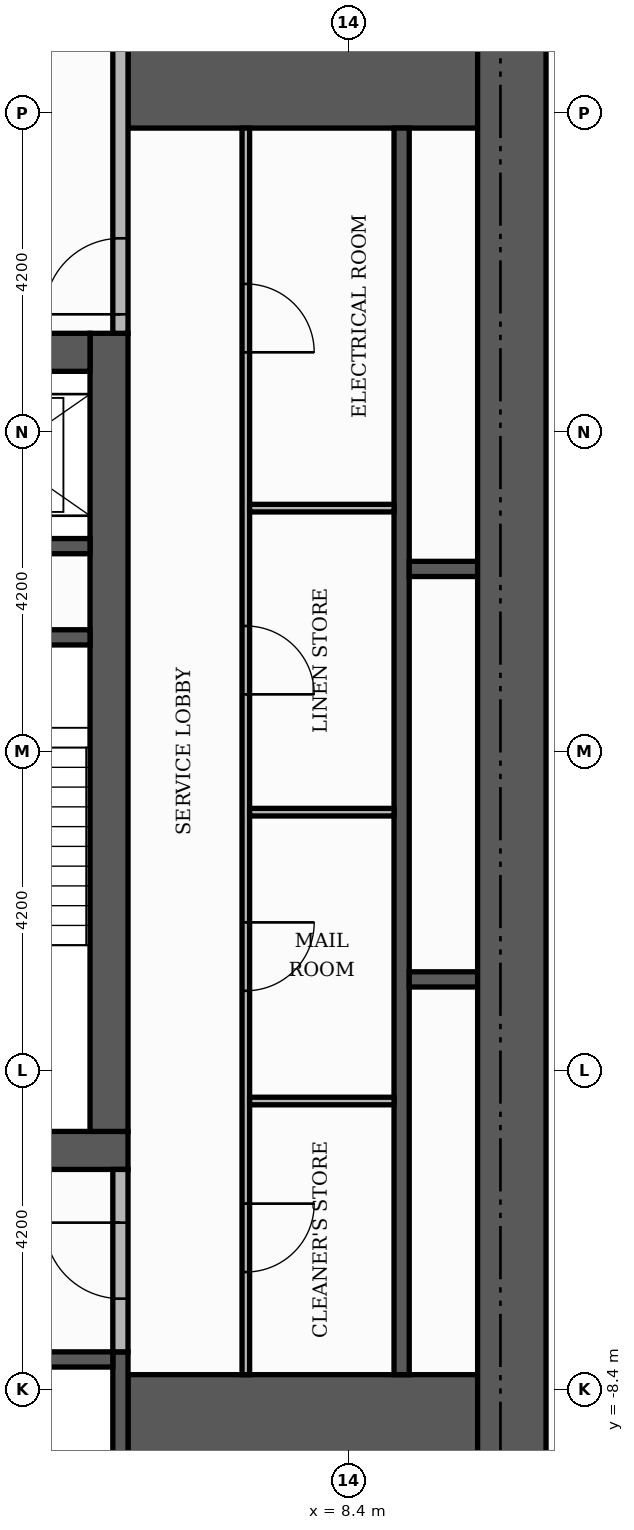
"""IFC4 building model, lengths in metres.
Left out: names, types, materials, properties, quantities, classifications, styles, units other than length and angle.
Written with IfcOpenShell. Run it as: python <this file> out.ifc"""

import sys

from ifc_helpers import new_model, si_unit, direction, frame, frame_2d, origin, place, context, subcontext, project, spatial, rectangle, extrude, element, fill, save


model = new_model("IFC4")
c1 = context("Model", 3, precision=1e-05, world=origin(), true_north=direction((0.0, 1.0)))
c2 = subcontext(c1, "Body", "Model", "MODEL_VIEW")
j1 = project(units=[si_unit("LENGTHUNIT", "METRE"), si_unit("PLANEANGLEUNIT", "RADIAN")], contexts=[c1])
p1 = place(None, origin())
s1 = spatial("IfcSite", under=j1, at=p1, CompositionType="ELEMENT")
p2 = place(p1, origin())
s2 = spatial("IfcBuilding", under=s1, at=p2, CompositionType="ELEMENT")
p3 = place(p2, frame((0.0, 0.0, 110.4)))
s3 = spatial("IfcBuildingStorey", under=s2, at=p3, CompositionType="ELEMENT", Elevation=110.4)
p4 = place(p3, frame((-5.5, -5.25, 0.0), z_axis=(0.0, 0.0, 1.0), x_axis=(1.0, 0.0, 0.0)))
e1 = element("IfcWall", 1, at=p4, inside=s3, PredefinedType="SHEAR", context=c2, shape_type="SweptSolid", body=[
    extrude(rectangle(XDim=11.0, YDim=0.5, at=frame_2d((5.5, 0.0))), origin(), (0.0, 0.0, 1.0), 3.48),
])
p5 = place(p4, frame((4.9, 0.0, 0.0)))
e2 = element("IfcOpeningElement", 2, at=p5, cuts=e1, PredefinedType="OPENING", context=c2, shape_type="SweptSolid", body=[
    extrude(rectangle(XDim=1.2, YDim=2.1, at=frame_2d((0.6, 1.05))), frame((0.0, 0.26, 0.0), z_axis=(0.0, -1.0, 0.0), x_axis=(1.0, 0.0, 0.0)), (0.0, 0.0, 1.0), 0.52),
])
p6 = place(p3, frame((5.25, -5.0, 0.0), z_axis=(0.0, 0.0, 1.0), x_axis=(0.0, 1.0, 0.0)))
e3 = element("IfcWall", 3, at=p6, inside=s3, PredefinedType="SHEAR", context=c2, shape_type="SweptSolid", body=[
    extrude(rectangle(XDim=10.5, YDim=0.5, at=frame_2d((5.25, 0.0))), origin(), (0.0, 0.0, 1.0), 3.48),
])
p7 = place(p3, frame((-5.0, 5.25, 0.0), z_axis=(0.0, 0.0, 1.0), x_axis=(1.0, 0.0, 0.0)))
e4 = element("IfcWall", 4, at=p7, inside=s3, PredefinedType="SHEAR", context=c2, shape_type="SweptSolid", body=[
    extrude(rectangle(XDim=10.0, YDim=0.5, at=frame_2d((5.0, 0.0))), origin(), (0.0, 0.0, 1.0), 3.48),
])
p8 = place(p7, frame((4.4, 0.0, 0.0)))
e5 = element("IfcOpeningElement", 5, at=p8, cuts=e4, PredefinedType="OPENING", context=c2, shape_type="SweptSolid", body=[
    extrude(rectangle(XDim=1.2, YDim=2.1, at=frame_2d((0.6, 1.05))), frame((0.0, 0.26, 0.0), z_axis=(0.0, -1.0, 0.0), x_axis=(1.0, 0.0, 0.0)), (0.0, 0.0, 1.0), 0.52),
])
for number, where, z_axis, x_axis in (
    (6, (5.5, -9.15, 0.0), (0.0, 0.0, 1.0), (1.0, 0.0, 0.0)),
    (7, (5.5, 9.15, 0.0), (0.0, 0.0, 1.0), (1.0, 0.0, 0.0)),
):
    element("IfcWall", number, at=place(p3, frame(where, z_axis=z_axis, x_axis=x_axis)), inside=s3, PredefinedType="SHEAR", context=c2, shape_type="SweptSolid", body=[
        extrude(rectangle(XDim=4.6, YDim=1.9, at=frame_2d((2.3, 0.0))), origin(), (0.0, 0.0, 1.0), 3.48),
    ])
p9 = place(p3, frame((2.15, 1.5, 0.0), z_axis=(0.0, 0.0, 1.0), x_axis=(1.0, 0.0, 0.0)))
e8 = element("IfcWall", 8, at=p9, inside=s3, PredefinedType="SHEAR", context=c2, shape_type="SweptSolid", body=[
    extrude(rectangle(XDim=2.85, YDim=0.2, at=frame_2d((1.425, 0.0))), origin(), (0.0, 0.0, 1.0), 3.48),
])
p10 = place(p3, frame((5.4, -10.1, 0.0), z_axis=(0.0, 0.0, 1.0), x_axis=(0.0, 1.0, 0.0)))
e9 = element("IfcWall", 9, at=p10, inside=s3, PredefinedType="SHEAR", context=c2, shape_type="SweptSolid", body=[
    extrude(rectangle(XDim=2.2, YDim=0.2, at=frame_2d((1.1, 0.0))), origin(), (0.0, 0.0, 1.0), 3.48),
])
p11 = place(p3, frame((9.1, -8.2, 0.0), z_axis=(0.0, 0.0, 1.0), x_axis=(0.0, 1.0, 0.0)))
e10 = element("IfcWall", 10, at=p11, inside=s3, PredefinedType="SHEAR", context=c2, shape_type="SweptSolid", body=[
    extrude(rectangle(XDim=16.4, YDim=0.2, at=frame_2d((8.2, 0.0))), origin(), (0.0, 0.0, 1.0), 3.48),
])
p12 = place(p3, frame((2.8, -8.0, 0.0), z_axis=(0.0, 0.0, 1.0), x_axis=(1.0, 0.0, 0.0)))
e11 = element("IfcWall", 11, at=p12, inside=s3, PredefinedType="SHEAR", context=c2, shape_type="SweptSolid", body=[
    extrude(rectangle(XDim=2.5, YDim=0.2, at=frame_2d((1.25, 0.0))), origin(), (0.0, 0.0, 1.0), 3.48),
])
for number, where, z_axis, x_axis in (
    (12, (9.2, -3.0, 0.0), (0.0, 0.0, 1.0), (1.0, 0.0, 0.0)),
    (13, (9.2, 2.4, 0.0), (0.0, 0.0, 1.0), (1.0, 0.0, 0.0)),
):
    element("IfcWall", number, at=place(p3, frame(where, z_axis=z_axis, x_axis=x_axis)), inside=s3, PredefinedType="SHEAR", context=c2, shape_type="SweptSolid", body=[
        extrude(rectangle(XDim=0.9, YDim=0.2, at=frame_2d((0.45, 0.0))), origin(), (0.0, 0.0, 1.0), 3.48),
    ])
p13 = place(p3, frame((2.15, 2.7, 0.0), z_axis=(0.0, 0.0, 1.0), x_axis=(1.0, 0.0, 0.0)))
e14 = element("IfcWall", 14, at=p13, inside=s3, PredefinedType="SHEAR", context=c2, shape_type="SweptSolid", body=[
    extrude(rectangle(XDim=2.85, YDim=0.2, at=frame_2d((1.425, 0.0))), origin(), (0.0, 0.0, 1.0), 3.48),
])
p14 = place(p3, frame((10.55, -10.1, 0.0), z_axis=(0.0, 0.0, 1.0), x_axis=(0.0, 1.0, 0.0)))
e15 = element("IfcWall", 15, at=p14, inside=s3, PredefinedType="SHEAR", context=c2, shape_type="SweptSolid", body=[
    extrude(rectangle(XDim=20.2, YDim=0.9, at=frame_2d((10.1, 0.0))), origin(), (0.0, 0.0, 1.0), 3.48),
])
p15 = place(p3, frame((7.05, -8.2, 0.0), z_axis=(0.0, 0.0, 1.0), x_axis=(0.0, 1.0, 0.0)))
e16 = element("IfcWall", 16, at=p15, inside=s3, PredefinedType="PARTITIONING", context=c2, shape_type="SweptSolid", body=[
    extrude(rectangle(XDim=16.4, YDim=0.1, at=frame_2d((8.2, 0.0))), origin(), (0.0, 0.0, 1.0), 3.48),
])
p16 = place(p15, frame((1.35, 0.0, 0.0)))
e17 = element("IfcOpeningElement", 17, at=p16, cuts=e16, PredefinedType="OPENING", context=c2, shape_type="SweptSolid", body=[
    extrude(rectangle(XDim=0.9, YDim=2.1, at=frame_2d((0.45, 1.05))), frame((0.0, 0.06, 0.0), z_axis=(0.0, -1.0, 0.0), x_axis=(1.0, 0.0, 0.0)), (0.0, 0.0, 1.0), 0.12),
])
p17 = place(p15, frame((5.05, 0.0, 0.0)))
e18 = element("IfcOpeningElement", 18, at=p17, cuts=e16, PredefinedType="OPENING", context=c2, shape_type="SweptSolid", body=[
    extrude(rectangle(XDim=0.9, YDim=2.1, at=frame_2d((0.45, 1.05))), frame((0.0, 0.06, 0.0), z_axis=(0.0, -1.0, 0.0), x_axis=(1.0, 0.0, 0.0)), (0.0, 0.0, 1.0), 0.12),
])
p18 = place(p15, frame((8.95, 0.0, 0.0)))
e19 = element("IfcOpeningElement", 19, at=p18, cuts=e16, PredefinedType="OPENING", context=c2, shape_type="SweptSolid", body=[
    extrude(rectangle(XDim=0.9, YDim=2.1, at=frame_2d((0.45, 1.05))), frame((0.0, 0.06, 0.0), z_axis=(0.0, -1.0, 0.0), x_axis=(1.0, 0.0, 0.0)), (0.0, 0.0, 1.0), 0.12),
])
p19 = place(p15, frame((13.45, 0.0, 0.0)))
e20 = element("IfcOpeningElement", 20, at=p19, cuts=e16, PredefinedType="OPENING", context=c2, shape_type="SweptSolid", body=[
    extrude(rectangle(XDim=0.9, YDim=2.1, at=frame_2d((0.45, 1.05))), frame((0.0, 0.06, 0.0), z_axis=(0.0, -1.0, 0.0), x_axis=(1.0, 0.0, 0.0)), (0.0, 0.0, 1.0), 0.12),
])
p20 = place(p3, frame((5.4, -7.9, 0.0), z_axis=(0.0, 0.0, 1.0), x_axis=(0.0, 1.0, 0.0)))
e21 = element("IfcWall", 21, at=p20, inside=s3, PredefinedType="PARTITIONING", context=c2, shape_type="SweptSolid", body=[
    extrude(rectangle(XDim=2.4, YDim=0.2, at=frame_2d((1.2, 0.0))), origin(), (0.0, 0.0, 1.0), 3.48),
])
p21 = place(p20, frame((0.7, 0.0, 0.0)))
e22 = element("IfcOpeningElement", 22, at=p21, cuts=e21, PredefinedType="OPENING", context=c2, shape_type="SweptSolid", body=[
    extrude(rectangle(XDim=1.0, YDim=2.1, at=frame_2d((0.5, 1.05))), frame((0.0, 0.11, 0.0), z_axis=(0.0, -1.0, 0.0), x_axis=(1.0, 0.0, 0.0)), (0.0, 0.0, 1.0), 0.22),
])
for number, where, z_axis, x_axis in (
    (23, (7.1, -4.6, 0.0), (0.0, 0.0, 1.0), (1.0, 0.0, 0.0)),
    (24, (7.1, -0.8, 0.0), (0.0, 0.0, 1.0), (1.0, 0.0, 0.0)),
    (25, (7.1, 3.2, 0.0), (0.0, 0.0, 1.0), (1.0, 0.0, 0.0)),
):
    element("IfcWall", number, at=place(p3, frame(where, z_axis=z_axis, x_axis=x_axis)), inside=s3, PredefinedType="PARTITIONING", context=c2, shape_type="SweptSolid", body=[
        extrude(rectangle(XDim=1.9, YDim=0.1, at=frame_2d((0.95, 0.0))), origin(), (0.0, 0.0, 1.0), 3.48),
    ])
p22 = place(p3, frame((5.4, 5.5, 0.0), z_axis=(0.0, 0.0, 1.0), x_axis=(0.0, 1.0, 0.0)))
e26 = element("IfcWall", 26, at=p22, inside=s3, PredefinedType="PARTITIONING", context=c2, shape_type="SweptSolid", body=[
    extrude(rectangle(XDim=4.6, YDim=0.2, at=frame_2d((2.3, 0.0))), origin(), (0.0, 0.0, 1.0), 3.48),
])
p23 = place(p22, frame((0.25, 0.0, 0.0)))
e27 = element("IfcOpeningElement", 27, at=p23, cuts=e26, PredefinedType="OPENING", context=c2, shape_type="SweptSolid", body=[
    extrude(rectangle(XDim=1.0, YDim=2.1, at=frame_2d((0.5, 1.05))), frame((0.0, 0.11, 0.0), z_axis=(0.0, -1.0, 0.0), x_axis=(1.0, 0.0, 0.0)), (0.0, 0.0, 1.0), 0.22),
])
p24 = place(p23, origin())
e28 = element("IfcDoor", 28, at=p24, inside=s3, OperationType="SINGLE_SWING_LEFT", PredefinedType="DOOR", context=c2, shape_type="SweptSolid", body=[
    extrude(rectangle(XDim=1.0, YDim=2.1, at=frame_2d((0.5, 1.05))), frame((0.0, 0.025, 0.0), z_axis=(0.0, -1.0, 0.0), x_axis=(1.0, 0.0, 0.0)), (0.0, 0.0, 1.0), 0.05),
])
fill(e27, e28)
p25 = place(p21, origin())
e29 = element("IfcDoor", 29, at=p25, inside=s3, OperationType="SINGLE_SWING_RIGHT", PredefinedType="DOOR", context=c2, shape_type="SweptSolid", body=[
    extrude(rectangle(XDim=1.0, YDim=2.1, at=frame_2d((0.5, 1.05))), frame((0.0, 0.025, 0.0), z_axis=(0.0, -1.0, 0.0), x_axis=(1.0, 0.0, 0.0)), (0.0, 0.0, 1.0), 0.05),
])
fill(e22, e29)
p26 = place(p16, frame((0.9, 0.0, 0.0), z_axis=(0.0, 0.0, 1.0), x_axis=(-1.0, 0.0, 0.0)))
e30 = element("IfcDoor", 30, at=p26, inside=s3, OperationType="SINGLE_SWING_RIGHT", PredefinedType="DOOR", context=c2, shape_type="SweptSolid", body=[
    extrude(rectangle(XDim=0.9, YDim=2.1, at=frame_2d((0.45, 1.05))), frame((0.0, 0.025, 0.0), z_axis=(0.0, -1.0, 0.0), x_axis=(1.0, 0.0, 0.0)), (0.0, 0.0, 1.0), 0.05),
])
fill(e17, e30)
p27 = place(p17, frame((0.9, 0.0, 0.0), z_axis=(0.0, 0.0, 1.0), x_axis=(-1.0, 0.0, 0.0)))
e31 = element("IfcDoor", 31, at=p27, inside=s3, OperationType="SINGLE_SWING_RIGHT", PredefinedType="DOOR", context=c2, shape_type="SweptSolid", body=[
    extrude(rectangle(XDim=0.9, YDim=2.1, at=frame_2d((0.45, 1.05))), frame((0.0, 0.025, 0.0), z_axis=(0.0, -1.0, 0.0), x_axis=(1.0, 0.0, 0.0)), (0.0, 0.0, 1.0), 0.05),
])
fill(e18, e31)
p28 = place(p18, frame((0.9, 0.0, 0.0), z_axis=(0.0, 0.0, 1.0), x_axis=(-1.0, 0.0, 0.0)))
e32 = element("IfcDoor", 32, at=p28, inside=s3, OperationType="SINGLE_SWING_LEFT", PredefinedType="DOOR", context=c2, shape_type="SweptSolid", body=[
    extrude(rectangle(XDim=0.9, YDim=2.1, at=frame_2d((0.45, 1.05))), frame((0.0, 0.025, 0.0), z_axis=(0.0, -1.0, 0.0), x_axis=(1.0, 0.0, 0.0)), (0.0, 0.0, 1.0), 0.05),
])
fill(e19, e32)
p29 = place(p19, frame((0.9, 0.0, 0.0), z_axis=(0.0, 0.0, 1.0), x_axis=(-1.0, 0.0, 0.0)))
e33 = element("IfcDoor", 33, at=p29, inside=s3, OperationType="SINGLE_SWING_LEFT", PredefinedType="DOOR", context=c2, shape_type="SweptSolid", body=[
    extrude(rectangle(XDim=0.9, YDim=2.1, at=frame_2d((0.45, 1.05))), frame((0.0, 0.025, 0.0), z_axis=(0.0, -1.0, 0.0), x_axis=(1.0, 0.0, 0.0)), (0.0, 0.0, 1.0), 0.05),
])
fill(e20, e33)
save(model, sys.argv[1])
